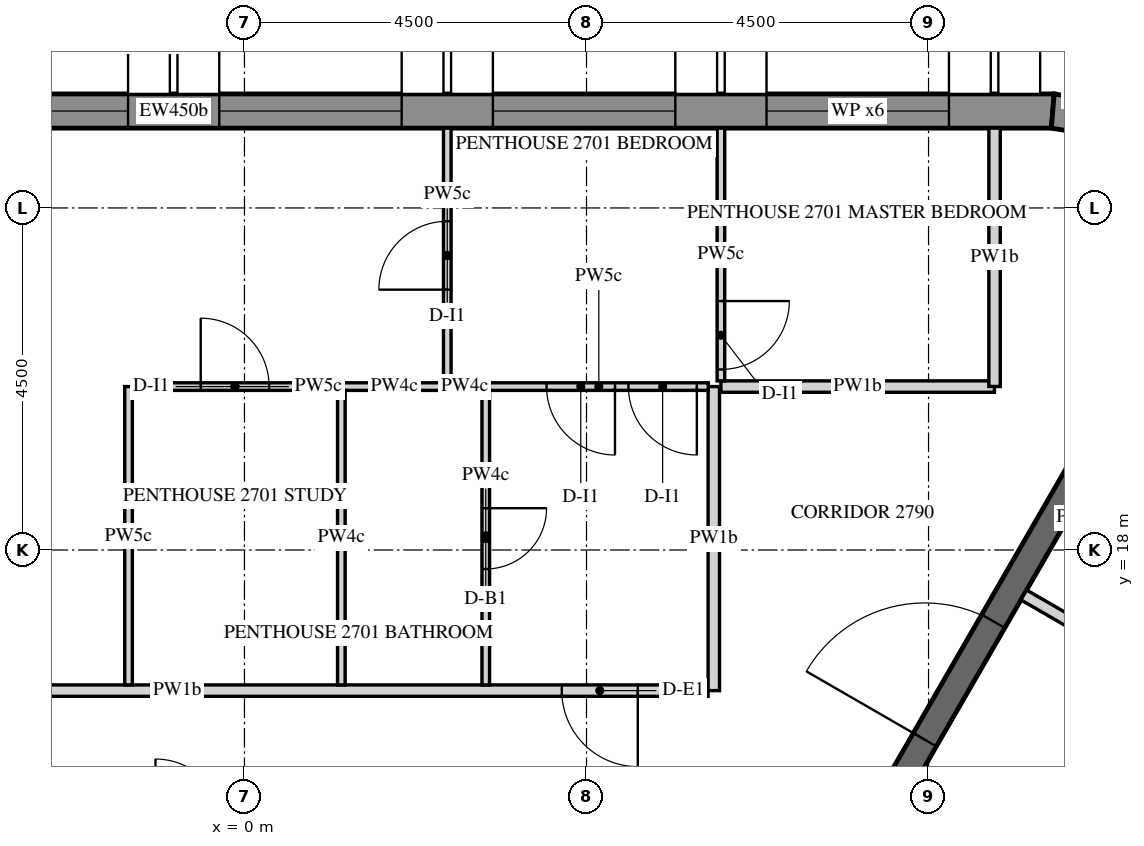
"""IFC4 building model, lengths in metres.
Left out: names, types, materials, properties, quantities, classifications, styles, units other than length and angle.
Written with IfcOpenShell. Run it as: python <this file> out.ifc"""

import sys

from ifc_helpers import new_model, si_unit, direction, frame, frame_2d, origin, place, context, subcontext, project, spatial, polyline, rectangle, outline, extrude, element, fill, save


model = new_model("IFC4")
c1 = context("Model", 3, precision=1e-05, world=origin(), true_north=direction((0.0, 1.0)))
c2 = subcontext(c1, "Body", "Model", "MODEL_VIEW")
j1 = project(units=[si_unit("LENGTHUNIT", "METRE"), si_unit("PLANEANGLEUNIT", "RADIAN")], contexts=[c1])
p1 = place(None, origin())
s1 = spatial("IfcSite", under=j1, at=p1, CompositionType="ELEMENT")
p2 = place(p1, origin())
s2 = spatial("IfcBuilding", under=s1, at=p2, CompositionType="ELEMENT")
p3 = place(p2, frame((0.0, 0.0, 349.5)))
s3 = spatial("IfcBuildingStorey", under=s2, at=p3, CompositionType="ELEMENT", Elevation=349.5)
p4 = place(p3, frame((10.634, 23.775, 0.0), z_axis=(0.0, 0.0, 1.0), x_axis=(-1.0, 0.0, 0.0)))
e1 = element("IfcWall", 1, at=p4, inside=s3, PredefinedType="SOLIDWALL", context=c2, shape_type="SweptSolid", body=[
    extrude(outline(polyline([(-0.018, -0.225), (23.153, -0.225), (23.111, 0.225), (0.018, 0.225), (-0.018, -0.225)])), origin(), (0.0, 0.0, 1.0), 3.75),
])
p5 = place(p4, frame((1.366, 0.0, 0.3)))
e2 = element("IfcOpeningElement", 2, at=p5, cuts=e1, PredefinedType="OPENING", context=c2, shape_type="SweptSolid", body=[
    extrude(rectangle(XDim=2.4, YDim=3.0, at=frame_2d((1.2, 1.5))), frame((0.0, 0.235, 0.0), z_axis=(0.0, -1.0, 0.0), x_axis=(1.0, 0.0, 0.0)), (0.0, 0.0, 1.0), 0.47),
])
p6 = place(p4, frame((4.966, 0.0, 0.3)))
e3 = element("IfcOpeningElement", 3, at=p6, cuts=e1, PredefinedType="OPENING", context=c2, shape_type="SweptSolid", body=[
    extrude(rectangle(XDim=2.4, YDim=3.0, at=frame_2d((1.2, 1.5))), frame((0.0, 0.235, 0.0), z_axis=(0.0, -1.0, 0.0), x_axis=(1.0, 0.0, 0.0)), (0.0, 0.0, 1.0), 0.47),
])
p7 = place(p4, frame((8.566, 0.0, 0.3)))
e4 = element("IfcOpeningElement", 4, at=p7, cuts=e1, PredefinedType="OPENING", context=c2, shape_type="SweptSolid", body=[
    extrude(rectangle(XDim=2.4, YDim=3.0, at=frame_2d((1.2, 1.5))), frame((0.0, 0.235, 0.0), z_axis=(0.0, -1.0, 0.0), x_axis=(1.0, 0.0, 0.0)), (0.0, 0.0, 1.0), 0.47),
])
p8 = place(p4, frame((12.166, 0.0, 0.3)))
e5 = element("IfcOpeningElement", 5, at=p8, cuts=e1, PredefinedType="OPENING", context=c2, shape_type="SweptSolid", body=[
    extrude(rectangle(XDim=2.4, YDim=3.0, at=frame_2d((1.2, 1.5))), frame((0.0, 0.235, 0.0), z_axis=(0.0, -1.0, 0.0), x_axis=(1.0, 0.0, 0.0)), (0.0, 0.0, 1.0), 0.47),
])
p9 = place(p4, frame((15.766, 0.0, 0.3)))
e6 = element("IfcOpeningElement", 6, at=p9, cuts=e1, PredefinedType="OPENING", context=c2, shape_type="SweptSolid", body=[
    extrude(rectangle(XDim=2.4, YDim=3.0, at=frame_2d((1.2, 1.5))), frame((0.0, 0.235, 0.0), z_axis=(0.0, -1.0, 0.0), x_axis=(1.0, 0.0, 0.0)), (0.0, 0.0, 1.0), 0.47),
])
p10 = place(p4, frame((19.366, 0.0, 0.3)))
e7 = element("IfcOpeningElement", 7, at=p10, cuts=e1, PredefinedType="OPENING", context=c2, shape_type="SweptSolid", body=[
    extrude(rectangle(XDim=2.4, YDim=3.0, at=frame_2d((1.2, 1.5))), frame((0.0, 0.235, 0.0), z_axis=(0.0, -1.0, 0.0), x_axis=(1.0, 0.0, 0.0)), (0.0, 0.0, 1.0), 0.47),
])
p11 = place(p3, frame((11.843, 23.576, 0.0), z_axis=(0.0, 0.0, 1.0), x_axis=(-0.986773862881, 0.162102879475, 0.0)))
e8 = element("IfcWall", 8, at=p11, inside=s3, PredefinedType="SOLIDWALL", context=c2, shape_type="SweptSolid", body=[
    extrude(outline(polyline([(-0.037, -0.225), (1.243, -0.225), (1.206, 0.225), (0.037, 0.225), (-0.037, -0.225)])), origin(), (0.0, 0.0, 1.0), 3.75),
])
p12 = place(p3, frame((5.773, 10.0, 0.0), z_axis=(0.0, 0.0, 1.0), x_axis=(0.500007911273, 0.866020836161, 0.0)))
e9 = element("IfcWall", 9, at=p12, inside=s3, PredefinedType="SHEAR", context=c2, shape_type="SweptSolid", body=[
    extrude(rectangle(XDim=14.51, YDim=0.35, at=frame_2d((7.255, 0.0))), origin(), (0.0, 0.0, 1.0), 3.75),
])
p13 = place(p12, frame((6.355, 0.0, 0.0)))
e10 = element("IfcOpeningElement", 10, at=p13, cuts=e9, PredefinedType="OPENING", context=c2, shape_type="SweptSolid", body=[
    extrude(rectangle(XDim=1.8, YDim=2.4, at=frame_2d((0.9, 1.2))), frame((0.0, 0.185, 0.0), z_axis=(0.0, -1.0, 0.0), x_axis=(1.0, 0.0, 0.0)), (0.0, 0.0, 1.0), 0.37),
])
p14 = place(p3, frame((6.1, 16.15, 0.0), z_axis=(0.0, 0.0, 1.0), x_axis=(-1.0, 0.0, 0.0)))
e11 = element("IfcWall", 11, at=p14, inside=s3, PredefinedType="PARTITIONING", context=c2, shape_type="SweptSolid", body=[
    extrude(rectangle(XDim=13.966, YDim=0.15, at=frame_2d((6.983, 0.0))), origin(), (0.0, 0.0, 1.0), 2.82),
])
p15 = place(p14, frame((0.925, 0.0, 0.0)))
e12 = element("IfcOpeningElement", 12, at=p15, cuts=e11, PredefinedType="OPENING", context=c2, shape_type="SweptSolid", body=[
    extrude(rectangle(XDim=1.0, YDim=2.1, at=frame_2d((0.5, 1.05))), frame((0.0, 0.085, 0.0), z_axis=(0.0, -1.0, 0.0), x_axis=(1.0, 0.0, 0.0)), (0.0, 0.0, 1.0), 0.17),
])
p16 = place(p3, frame((6.175, 20.15, 0.0), z_axis=(0.0, 0.0, 1.0), x_axis=(0.0, -1.0, 0.0)))
e13 = element("IfcWall", 13, at=p16, inside=s3, PredefinedType="PARTITIONING", context=c2, shape_type="SweptSolid", body=[
    extrude(rectangle(XDim=4.0, YDim=0.15, at=frame_2d((2.0, 0.0))), origin(), (0.0, 0.0, 1.0), 2.82),
])
p17 = place(p3, frame((9.867, 20.15, 0.0), z_axis=(0.0, 0.0, 1.0), x_axis=(-1.0, 0.0, 0.0)))
e14 = element("IfcWall", 14, at=p17, inside=s3, PredefinedType="PARTITIONING", context=c2, shape_type="SweptSolid", body=[
    extrude(rectangle(XDim=3.599, YDim=0.15, at=frame_2d((1.799, 0.0))), origin(), (0.0, 0.0, 1.0), 2.82),
])
p18 = place(p3, frame((9.868, 23.55, 0.0), z_axis=(0.0, 0.0, 1.0), x_axis=(0.0, -1.0, 0.0)))
e15 = element("IfcWall", 15, at=p18, inside=s3, PredefinedType="PARTITIONING", context=c2, shape_type="SweptSolid", body=[
    extrude(rectangle(XDim=3.399, YDim=0.15, at=frame_2d((1.699, 0.0))), origin(), (0.0, 0.0, 1.0), 2.82),
])
p19 = place(p3, frame((9.142, 11.885, 0.0), z_axis=(0.0, 0.0, 1.0), x_axis=(0.500004822225, 0.866022619654, 0.0)))
e16 = element("IfcWall", 16, at=p19, inside=s3, PredefinedType="PARTITIONING", context=c2, shape_type="SweptSolid", body=[
    extrude(rectangle(XDim=5.339, YDim=0.15, at=frame_2d((2.669, 0.0))), origin(), (0.0, 0.0, 1.0), 2.82),
])
p20 = place(p3, frame((11.747, 16.546, 0.0), z_axis=(0.0, 0.0, 1.0), x_axis=(-0.866013532718, 0.500020560727, 0.0)))
e17 = element("IfcWall", 17, at=p20, inside=s3, PredefinedType="PARTITIONING", context=c2, shape_type="SweptSolid", body=[
    extrude(rectangle(XDim=1.725, YDim=0.15, at=frame_2d((0.863, 0.0))), origin(), (0.0, 0.0, 1.0), 2.82),
])
p21 = place(p3, frame((1.275, 20.15, 0.0), z_axis=(0.0, 0.0, 1.0), x_axis=(1.0, 0.0, 0.0)))
e18 = element("IfcWall", 18, at=p21, inside=s3, PredefinedType="PARTITIONING", context=c2, shape_type="SweptSolid", body=[
    extrude(rectangle(XDim=1.396, YDim=0.1, at=frame_2d((0.698, 0.0))), origin(), (0.0, 0.0, 1.0), 2.82),
])
p22 = place(p3, frame((2.668, 20.2, 0.0), z_axis=(0.0, 0.0, 1.0), x_axis=(0.0, 1.0, 0.0)))
e19 = element("IfcWall", 19, at=p22, inside=s3, PredefinedType="PARTITIONING", context=c2, shape_type="SweptSolid", body=[
    extrude(rectangle(XDim=3.35, YDim=0.1, at=frame_2d((1.675, 0.0))), origin(), (0.0, 0.0, 1.0), 2.82),
])
p23 = place(p22, frame((1.225, 0.0, 0.0)))
e20 = element("IfcOpeningElement", 20, at=p23, cuts=e19, PredefinedType="OPENING", context=c2, shape_type="SweptSolid", body=[
    extrude(rectangle(XDim=0.9, YDim=2.1, at=frame_2d((0.45, 1.05))), frame((0.0, 0.06, 0.0), z_axis=(0.0, -1.0, 0.0), x_axis=(1.0, 0.0, 0.0)), (0.0, 0.0, 1.0), 0.12),
])
p24 = place(p3, frame((-1.525, 16.225, 0.0), z_axis=(0.0, 0.0, 1.0), x_axis=(0.0, 1.0, 0.0)))
e21 = element("IfcWall", 21, at=p24, inside=s3, PredefinedType="PARTITIONING", context=c2, shape_type="SweptSolid", body=[
    extrude(rectangle(XDim=3.925, YDim=0.1, at=frame_2d((1.962, 0.0))), origin(), (0.0, 0.0, 1.0), 2.82),
])
p25 = place(p3, frame((-1.475, 20.15, 0.0), z_axis=(0.0, 0.0, 1.0), x_axis=(1.0, 0.0, 0.0)))
e22 = element("IfcWall", 22, at=p25, inside=s3, PredefinedType="PARTITIONING", context=c2, shape_type="SweptSolid", body=[
    extrude(rectangle(XDim=2.7, YDim=0.1, at=frame_2d((1.35, 0.0))), origin(), (0.0, 0.0, 1.0), 2.82),
])
p26 = place(p25, frame((0.9, 0.0, 0.0)))
e23 = element("IfcOpeningElement", 23, at=p26, cuts=e22, PredefinedType="OPENING", context=c2, shape_type="SweptSolid", body=[
    extrude(rectangle(XDim=0.9, YDim=2.1, at=frame_2d((0.45, 1.05))), frame((0.0, 0.06, 0.0), z_axis=(0.0, -1.0, 0.0), x_axis=(1.0, 0.0, 0.0)), (0.0, 0.0, 1.0), 0.12),
])
p27 = place(p3, frame((3.175, 20.15, 0.0), z_axis=(0.0, 0.0, 1.0), x_axis=(0.0, -1.0, 0.0)))
e24 = element("IfcWall", 24, at=p27, inside=s3, PredefinedType="PARTITIONING", context=c2, shape_type="SweptSolid", body=[
    extrude(rectangle(XDim=3.925, YDim=0.1, at=frame_2d((1.962, 0.0))), origin(), (0.0, 0.0, 1.0), 2.82),
])
p28 = place(p27, frame((1.6, 0.0, 0.0)))
e25 = element("IfcOpeningElement", 25, at=p28, cuts=e24, PredefinedType="OPENING", context=c2, shape_type="SweptSolid", body=[
    extrude(rectangle(XDim=0.8, YDim=2.1, at=frame_2d((0.4, 1.05))), frame((0.0, 0.06, 0.0), z_axis=(0.0, -1.0, 0.0), x_axis=(1.0, 0.0, 0.0)), (0.0, 0.0, 1.0), 0.12),
])
p29 = place(p3, frame((6.102, 20.15, 0.0), z_axis=(0.0, 0.0, 1.0), x_axis=(-1.0, 0.0, 0.0)))
e26 = element("IfcWall", 26, at=p29, inside=s3, PredefinedType="PARTITIONING", context=c2, shape_type="SweptSolid", body=[
    extrude(rectangle(XDim=2.879, YDim=0.1, at=frame_2d((1.439, 0.0))), origin(), (0.0, 0.0, 1.0), 2.82),
])
p30 = place(p29, frame((0.15, 0.0, 0.0)))
e27 = element("IfcOpeningElement", 27, at=p30, cuts=e26, PredefinedType="OPENING", context=c2, shape_type="SweptSolid", body=[
    extrude(rectangle(XDim=0.9, YDim=2.1, at=frame_2d((0.45, 1.05))), frame((0.0, 0.06, 0.0), z_axis=(0.0, -1.0, 0.0), x_axis=(1.0, 0.0, 0.0)), (0.0, 0.0, 1.0), 0.12),
])
p31 = place(p29, frame((1.227, 0.0, 0.0)))
e28 = element("IfcOpeningElement", 28, at=p31, cuts=e26, PredefinedType="OPENING", context=c2, shape_type="SweptSolid", body=[
    extrude(rectangle(XDim=0.9, YDim=2.1, at=frame_2d((0.45, 1.05))), frame((0.0, 0.06, 0.0), z_axis=(0.0, -1.0, 0.0), x_axis=(1.0, 0.0, 0.0)), (0.0, 0.0, 1.0), 0.12),
])
p32 = place(p3, frame((3.127, 20.15, 0.0), z_axis=(0.0, 0.0, 1.0), x_axis=(-1.0, 0.0, 0.0)))
e29 = element("IfcWall", 29, at=p32, inside=s3, PredefinedType="PARTITIONING", context=c2, shape_type="SweptSolid", body=[
    extrude(rectangle(XDim=0.458, YDim=0.1, at=frame_2d((0.229, 0.0))), origin(), (0.0, 0.0, 1.0), 2.82),
])
p33 = place(p3, frame((1.275, 20.1, 0.0), z_axis=(0.0, 0.0, 1.0), x_axis=(0.0, -1.0, 0.0)))
e30 = element("IfcWall", 30, at=p33, inside=s3, PredefinedType="PARTITIONING", context=c2, shape_type="SweptSolid", body=[
    extrude(rectangle(XDim=3.875, YDim=0.1, at=frame_2d((1.938, 0.0))), origin(), (0.0, 0.0, 1.0), 2.82),
])
p34 = place(p3, frame((6.268, 23.55, 0.0), z_axis=(0.0, 0.0, 1.0), x_axis=(0.0, -1.0, 0.0)))
e31 = element("IfcWall", 31, at=p34, inside=s3, PredefinedType="PARTITIONING", context=c2, shape_type="SweptSolid", body=[
    extrude(rectangle(XDim=3.325, YDim=0.1, at=frame_2d((1.663, 0.0))), origin(), (0.0, 0.0, 1.0), 2.82),
])
p35 = place(p34, frame((2.275, 0.0, 0.0)))
e32 = element("IfcOpeningElement", 32, at=p35, cuts=e31, PredefinedType="OPENING", context=c2, shape_type="SweptSolid", body=[
    extrude(rectangle(XDim=0.9, YDim=2.1, at=frame_2d((0.45, 1.05))), frame((0.0, 0.06, 0.0), z_axis=(0.0, -1.0, 0.0), x_axis=(1.0, 0.0, 0.0)), (0.0, 0.0, 1.0), 0.12),
])
p36 = place(p5, frame((0.0, 0.155, 0.0)))
e33 = element("IfcWindow", 33, at=p36, inside=s3, PartitioningType="DOUBLE_PANEL_VERTICAL", PredefinedType="WINDOW", context=c2, shape_type="SweptSolid", body=[
    extrude(rectangle(XDim=2.4, YDim=3.0, at=frame_2d((1.2, 1.5))), frame((0.0, 0.03, 0.0), z_axis=(0.0, -1.0, 0.0), x_axis=(1.0, 0.0, 0.0)), (0.0, 0.0, 1.0), 0.06),
])
fill(e2, e33)
p37 = place(p6, frame((0.0, 0.155, 0.0)))
e34 = element("IfcWindow", 34, at=p37, inside=s3, PartitioningType="DOUBLE_PANEL_VERTICAL", PredefinedType="WINDOW", context=c2, shape_type="SweptSolid", body=[
    extrude(rectangle(XDim=2.4, YDim=3.0, at=frame_2d((1.2, 1.5))), frame((0.0, 0.03, 0.0), z_axis=(0.0, -1.0, 0.0), x_axis=(1.0, 0.0, 0.0)), (0.0, 0.0, 1.0), 0.06),
])
fill(e3, e34)
p38 = place(p7, frame((0.0, 0.155, 0.0)))
e35 = element("IfcWindow", 35, at=p38, inside=s3, PartitioningType="DOUBLE_PANEL_VERTICAL", PredefinedType="WINDOW", context=c2, shape_type="SweptSolid", body=[
    extrude(rectangle(XDim=2.4, YDim=3.0, at=frame_2d((1.2, 1.5))), frame((0.0, 0.03, 0.0), z_axis=(0.0, -1.0, 0.0), x_axis=(1.0, 0.0, 0.0)), (0.0, 0.0, 1.0), 0.06),
])
fill(e4, e35)
p39 = place(p8, frame((0.0, 0.155, 0.0)))
e36 = element("IfcWindow", 36, at=p39, inside=s3, PartitioningType="DOUBLE_PANEL_VERTICAL", PredefinedType="WINDOW", context=c2, shape_type="SweptSolid", body=[
    extrude(rectangle(XDim=2.4, YDim=3.0, at=frame_2d((1.2, 1.5))), frame((0.0, 0.03, 0.0), z_axis=(0.0, -1.0, 0.0), x_axis=(1.0, 0.0, 0.0)), (0.0, 0.0, 1.0), 0.06),
])
fill(e5, e36)
p40 = place(p13, origin())
e37 = element("IfcDoor", 37, at=p40, inside=s3, OperationType="DOUBLE_DOOR_SINGLE_SWING", PredefinedType="DOOR", context=c2, shape_type="SweptSolid", body=[
    extrude(rectangle(XDim=1.8, YDim=2.4, at=frame_2d((0.9, 1.2))), frame((0.0, 0.025, 0.0), z_axis=(0.0, -1.0, 0.0), x_axis=(1.0, 0.0, 0.0)), (0.0, 0.0, 1.0), 0.05),
])
fill(e10, e37)
p41 = place(p15, origin())
e38 = element("IfcDoor", 38, at=p41, inside=s3, OperationType="SINGLE_SWING_RIGHT", PredefinedType="DOOR", context=c2, shape_type="SweptSolid", body=[
    extrude(rectangle(XDim=1.0, YDim=2.1, at=frame_2d((0.5, 1.05))), frame((0.0, 0.025, 0.0), z_axis=(0.0, -1.0, 0.0), x_axis=(1.0, 0.0, 0.0)), (0.0, 0.0, 1.0), 0.05),
])
fill(e12, e38)
p42 = place(p28, origin())
e39 = element("IfcDoor", 39, at=p42, inside=s3, OperationType="SINGLE_SWING_LEFT", PredefinedType="DOOR", context=c2, shape_type="SweptSolid", body=[
    extrude(rectangle(XDim=0.8, YDim=2.1, at=frame_2d((0.4, 1.05))), frame((0.0, 0.025, 0.0), z_axis=(0.0, -1.0, 0.0), x_axis=(1.0, 0.0, 0.0)), (0.0, 0.0, 1.0), 0.05),
])
fill(e25, e39)
p43 = place(p30, origin())
e40 = element("IfcDoor", 40, at=p43, inside=s3, OperationType="SINGLE_SWING_LEFT", PredefinedType="DOOR", context=c2, shape_type="SweptSolid", body=[
    extrude(rectangle(XDim=0.9, YDim=2.1, at=frame_2d((0.45, 1.05))), frame((0.0, 0.025, 0.0), z_axis=(0.0, -1.0, 0.0), x_axis=(1.0, 0.0, 0.0)), (0.0, 0.0, 1.0), 0.05),
])
fill(e27, e40)
p44 = place(p35, origin())
e41 = element("IfcDoor", 41, at=p44, inside=s3, OperationType="SINGLE_SWING_RIGHT", PredefinedType="DOOR", context=c2, shape_type="SweptSolid", body=[
    extrude(rectangle(XDim=0.9, YDim=2.1, at=frame_2d((0.45, 1.05))), frame((0.0, 0.025, 0.0), z_axis=(0.0, -1.0, 0.0), x_axis=(1.0, 0.0, 0.0)), (0.0, 0.0, 1.0), 0.05),
])
fill(e32, e41)
p45 = place(p31, origin())
e42 = element("IfcDoor", 42, at=p45, inside=s3, OperationType="SINGLE_SWING_LEFT", PredefinedType="DOOR", context=c2, shape_type="SweptSolid", body=[
    extrude(rectangle(XDim=0.9, YDim=2.1, at=frame_2d((0.45, 1.05))), frame((0.0, 0.025, 0.0), z_axis=(0.0, -1.0, 0.0), x_axis=(1.0, 0.0, 0.0)), (0.0, 0.0, 1.0), 0.05),
])
fill(e28, e42)
p46 = place(p26, origin())
e43 = element("IfcDoor", 43, at=p46, inside=s3, OperationType="SINGLE_SWING_LEFT", PredefinedType="DOOR", context=c2, shape_type="SweptSolid", body=[
    extrude(rectangle(XDim=0.9, YDim=2.1, at=frame_2d((0.45, 1.05))), frame((0.0, 0.025, 0.0), z_axis=(0.0, -1.0, 0.0), x_axis=(1.0, 0.0, 0.0)), (0.0, 0.0, 1.0), 0.05),
])
fill(e23, e43)
p47 = place(p23, origin())
e44 = element("IfcDoor", 44, at=p47, inside=s3, OperationType="SINGLE_SWING_LEFT", PredefinedType="DOOR", context=c2, shape_type="SweptSolid", body=[
    extrude(rectangle(XDim=0.9, YDim=2.1, at=frame_2d((0.45, 1.05))), frame((0.0, 0.025, 0.0), z_axis=(0.0, -1.0, 0.0), x_axis=(1.0, 0.0, 0.0)), (0.0, 0.0, 1.0), 0.05),
])
fill(e20, e44)
save(model, sys.argv[1])
